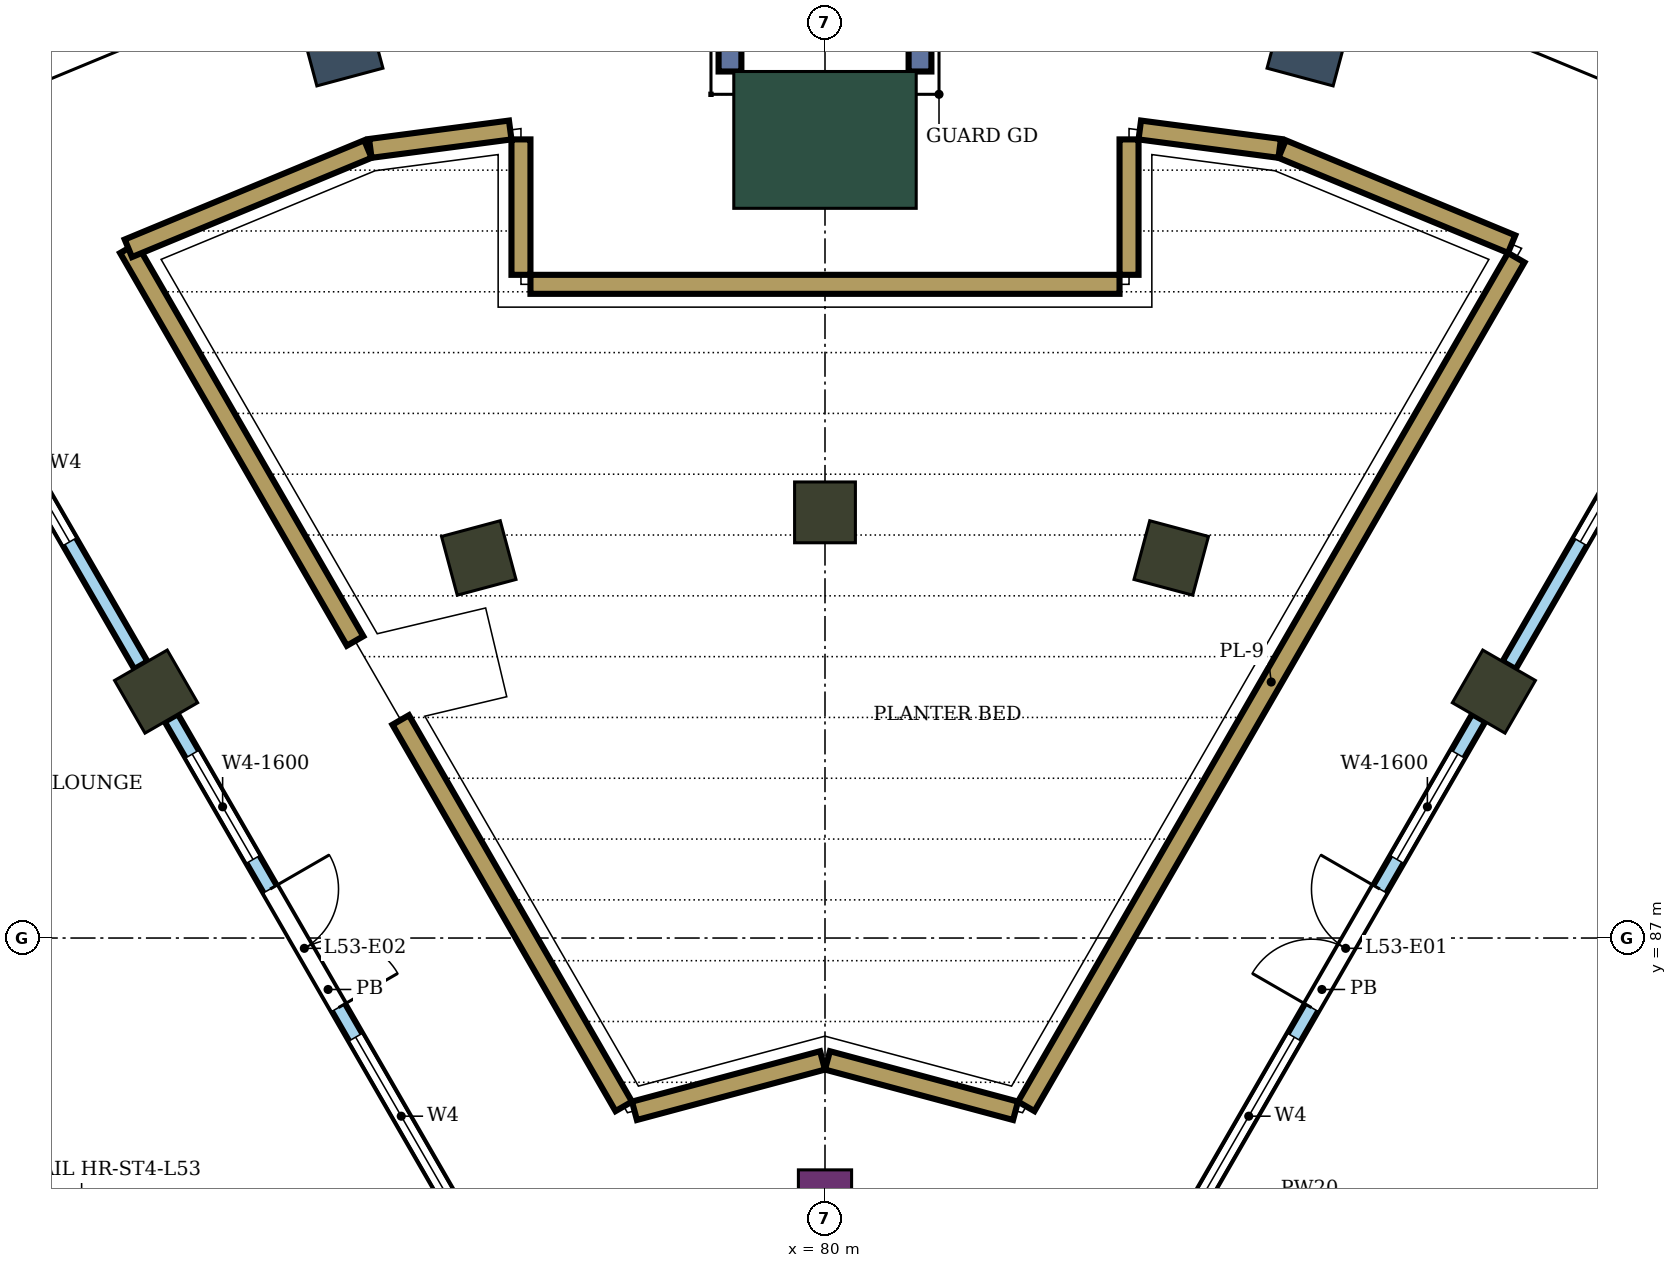
"""IFC4 building model, lengths in metres.
Left out: names, types, materials, properties, quantities, classifications, styles, units other than length and angle.
Written with IfcOpenShell. Run it as: python <this file> out.ifc"""

import sys

from ifc_helpers import new_model, si_unit, direction, frame, frame_2d, origin, origin_2d, place, context, subcontext, project, spatial, rectangle, extrude, element, fill, save


model = new_model("IFC4")
c1 = context("Model", 3, precision=1e-05, world=origin(), true_north=direction((0.0, 1.0)))
c2 = subcontext(c1, "Body", "Model", "MODEL_VIEW")
j1 = project(units=[si_unit("LENGTHUNIT", "METRE"), si_unit("PLANEANGLEUNIT", "RADIAN")], contexts=[c1])
p1 = place(None, origin())
s1 = spatial("IfcSite", under=j1, at=p1, CompositionType="ELEMENT")
p2 = place(p1, origin())
s2 = spatial("IfcBuilding", under=s1, at=p2, CompositionType="ELEMENT")
p3 = place(p2, frame((0.0, 0.0, 229.3)))
s3 = spatial("IfcBuildingStorey", under=s2, at=p3, CompositionType="ELEMENT", Elevation=229.3)
for number, where, z_axis, x_axis in (
    (1, (86.367, 98.762, 0.0), (0.0, 0.0, 1.0), (0.259, 0.966, 0.0)),
    (2, (73.633, 98.762, 0.0), (0.0, 0.0, 1.0), (-0.259, 0.966, 0.0)),
):
    element("IfcColumn", number, at=place(p3, frame(where, z_axis=z_axis, x_axis=x_axis)), inside=s3, PredefinedType="COLUMN", context=c2, shape_type="SweptSolid", body=[
        extrude(rectangle(XDim=0.9, YDim=0.9, at=origin_2d()), origin(), (0.0, 0.0, 1.0), 8.0),
    ])
for number, where, z_axis, x_axis in (
    (3, (88.8, 90.242, 0.0), (0.0, 0.0, 1.0), (0.5, 0.866, 0.0)),
    (4, (84.555, 92.0, 0.0), (0.0, 0.0, 1.0), (0.259, 0.966, 0.0)),
    (5, (80.0, 92.6, 0.0), (0.0, 0.0, 1.0), (0.0, 1.0, 0.0)),
    (6, (75.445, 92.0, 0.0), (0.0, 0.0, 1.0), (-0.259, 0.966, 0.0)),
    (7, (71.2, 90.242, 0.0), (0.0, 0.0, 1.0), (-0.5, 0.866, 0.0)),
):
    element("IfcColumn", number, at=place(p3, frame(where, z_axis=z_axis, x_axis=x_axis)), inside=s3, PredefinedType="COLUMN", context=c2, shape_type="SweptSolid", body=[
        extrude(rectangle(XDim=0.8, YDim=0.8, at=origin_2d()), origin(), (0.0, 0.0, 1.0), 8.0),
    ])
p4 = place(p3, frame((80.0, 83.6, 0.0), z_axis=(0.0, 0.0, 1.0), x_axis=(0.0, 1.0, 0.0)))
e8 = element("IfcColumn", 8, at=p4, inside=s3, PredefinedType="COLUMN", context=c2, shape_type="SweptSolid", body=[
    extrude(rectangle(XDim=0.7, YDim=0.7, at=origin_2d()), origin(), (0.0, 0.0, 1.0), 8.0),
])
p5 = place(p3, frame((80.0, 97.5, 0.0), z_axis=(0.0, 0.0, 1.0), x_axis=(0.0, 1.0, 0.0)))
e9 = element("IfcColumn", 9, at=p5, inside=s3, PredefinedType="COLUMN", context=c2, shape_type="SweptSolid", body=[
    extrude(rectangle(XDim=1.8, YDim=2.4, at=origin_2d()), origin(), (0.0, 0.0, 1.0), 8.0),
])
for number, where, z_axis, x_axis in (
    (10, (81.25, 98.4, 0.0), (0.0, 0.0, 1.0), (0.0, 1.0, 0.0)),
    (11, (78.75, 98.4, 0.0), (0.0, 0.0, 1.0), (0.0, 1.0, 0.0)),
):
    element("IfcWall", number, at=place(p3, frame(where, z_axis=z_axis, x_axis=x_axis)), inside=s3, PredefinedType="NOTDEFINED", context=c2, shape_type="SweptSolid", body=[
        extrude(rectangle(XDim=2.416, YDim=0.3, at=frame_2d((1.208, 0.0))), origin(), (0.0, 0.0, 1.0), 8.0),
    ])
p6 = place(p3, frame((70.835, 96.074, 0.0), z_axis=(0.0, 0.0, 1.0), x_axis=(0.500003486784, -0.866023390679, 0.0)))
e12 = element("IfcWall", 12, at=p6, inside=s3, PredefinedType="USERDEFINED", context=c2, shape_type="SweptSolid", body=[
    extrude(rectangle(XDim=5.966, YDim=0.25, at=frame_2d((2.983, 0.0))), origin(), (0.0, 0.0, 1.0), 0.6),
])
p7 = place(p3, frame((74.418, 89.869, 0.0), z_axis=(0.0, 0.0, 1.0), x_axis=(0.499999689456, -0.866025583077, 0.0)))
e13 = element("IfcWall", 13, at=p7, inside=s3, PredefinedType="USERDEFINED", context=c2, shape_type="SweptSolid", body=[
    extrude(rectangle(XDim=5.87, YDim=0.25, at=frame_2d((2.935, 0.0))), origin(), (0.0, 0.0, 1.0), 0.6),
])
for number, where, z_axis, x_axis in (
    (14, (77.493, 84.727, 0.0), (0.0, 0.0, 1.0), (0.966, 0.259, 0.0)),
    (15, (80.032, 85.39, 0.0), (0.0, 0.0, 1.0), (0.966, -0.259, 0.0)),
):
    element("IfcWall", number, at=place(p3, frame(where, z_axis=z_axis, x_axis=x_axis)), inside=s3, PredefinedType="USERDEFINED", context=c2, shape_type="SweptSolid", body=[
        extrude(rectangle(XDim=2.562, YDim=0.25, at=frame_2d((1.281, 0.0))), origin(), (0.0, 0.0, 1.0), 0.6),
    ])
p8 = place(p3, frame((82.647, 84.785, 0.0), z_axis=(0.0, 0.0, 1.0), x_axis=(0.499992370413, 0.866029808684, 0.0)))
e16 = element("IfcWall", 16, at=p8, inside=s3, PredefinedType="USERDEFINED", context=c2, shape_type="SweptSolid", body=[
    extrude(rectangle(XDim=12.893, YDim=0.25, at=frame_2d((6.446, 0.0))), origin(), (0.0, 0.0, 1.0), 0.6),
])
p9 = place(p3, frame((89.033, 96.129, 0.0), z_axis=(0.0, 0.0, 1.0), x_axis=(-0.923863886655, 0.382721202621, 0.0)))
e17 = element("IfcWall", 17, at=p9, inside=s3, PredefinedType="USERDEFINED", context=c2, shape_type="SweptSolid", body=[
    extrude(rectangle(XDim=3.269, YDim=0.25, at=frame_2d((1.634, 0.0))), origin(), (0.0, 0.0, 1.0), 0.6),
])
p10 = place(p3, frame((85.982, 97.388, 0.0), z_axis=(0.0, 0.0, 1.0), x_axis=(-0.991436829887, 0.130587182926, 0.0)))
e18 = element("IfcWall", 18, at=p10, inside=s3, PredefinedType="USERDEFINED", context=c2, shape_type="SweptSolid", body=[
    extrude(rectangle(XDim=1.856, YDim=0.25, at=frame_2d((0.928, 0.0))), origin(), (0.0, 0.0, 1.0), 0.6),
])
p11 = place(p3, frame((84.0, 97.507, 0.0), z_axis=(0.0, 0.0, 1.0), x_axis=(0.0, -1.0, 0.0)))
e19 = element("IfcWall", 19, at=p11, inside=s3, PredefinedType="USERDEFINED", context=c2, shape_type="SweptSolid", body=[
    extrude(rectangle(XDim=1.781, YDim=0.25, at=frame_2d((0.891, 0.0))), origin(), (0.0, 0.0, 1.0), 0.6),
])
p12 = place(p3, frame((83.875, 95.6, 0.0), z_axis=(0.0, 0.0, 1.0), x_axis=(-1.0, 0.0, 0.0)))
e20 = element("IfcWall", 20, at=p12, inside=s3, PredefinedType="USERDEFINED", context=c2, shape_type="SweptSolid", body=[
    extrude(rectangle(XDim=7.75, YDim=0.25, at=frame_2d((3.875, 0.0))), origin(), (0.0, 0.0, 1.0), 0.6),
])
p13 = place(p3, frame((76.0, 95.725, 0.0), z_axis=(0.0, 0.0, 1.0), x_axis=(0.0, 1.0, 0.0)))
e21 = element("IfcWall", 21, at=p13, inside=s3, PredefinedType="USERDEFINED", context=c2, shape_type="SweptSolid", body=[
    extrude(rectangle(XDim=1.781, YDim=0.25, at=frame_2d((0.891, 0.0))), origin(), (0.0, 0.0, 1.0), 0.6),
])
p14 = place(p3, frame((75.859, 97.631, 0.0), z_axis=(0.0, 0.0, 1.0), x_axis=(-0.991436829887, -0.130587182926, 0.0)))
e22 = element("IfcWall", 22, at=p14, inside=s3, PredefinedType="USERDEFINED", context=c2, shape_type="SweptSolid", body=[
    extrude(rectangle(XDim=1.856, YDim=0.25, at=frame_2d((0.928, 0.0))), origin(), (0.0, 0.0, 1.0), 0.6),
])
p15 = place(p3, frame((73.986, 97.38, 0.0), z_axis=(0.0, 0.0, 1.0), x_axis=(-0.923871147788, -0.38270367425, 0.0)))
e23 = element("IfcWall", 23, at=p15, inside=s3, PredefinedType="USERDEFINED", context=c2, shape_type="SweptSolid", body=[
    extrude(rectangle(XDim=3.411, YDim=0.25, at=frame_2d((1.706, 0.0))), origin(), (0.0, 0.0, 1.0), 0.6),
])
p16 = place(p3, frame((84.475, 82.751, 0.0), z_axis=(0.0, 0.0, 1.0), x_axis=(0.499996545922, 0.866027397988, 0.0)))
e24 = element("IfcWall", 24, at=p16, inside=s3, PredefinedType="NOTDEFINED", context=c2, shape_type="SweptSolid", body=[
    extrude(rectangle(XDim=8.25, YDim=0.2, at=frame_2d((4.125, 0.0))), origin(), (0.0, 0.0, 1.0), 8.0),
])
p17 = place(p16, frame((1.0, 0.0, 0.3)))
e25 = element("IfcOpeningElement", 25, at=p17, cuts=e24, PredefinedType="OPENING", context=c2, shape_type="SweptSolid", body=[
    extrude(rectangle(XDim=2.4, YDim=3.6, at=frame_2d((1.2, 1.8))), frame((0.0, 0.11, 0.0), z_axis=(0.0, -1.0, 0.0), x_axis=(1.0, 0.0, 0.0)), (0.0, 0.0, 1.0), 0.22),
])
p18 = place(p16, frame((3.85, 0.0, 0.0)))
e26 = element("IfcOpeningElement", 26, at=p18, cuts=e24, PredefinedType="OPENING", context=c2, shape_type="SweptSolid", body=[
    extrude(rectangle(XDim=1.8, YDim=2.4, at=frame_2d((0.9, 1.2))), frame((0.0, 0.11, 0.0), z_axis=(0.0, -1.0, 0.0), x_axis=(1.0, 0.0, 0.0)), (0.0, 0.0, 1.0), 0.22),
])
p19 = place(p16, frame((6.1, 0.0, 0.3)))
e27 = element("IfcOpeningElement", 27, at=p19, cuts=e24, PredefinedType="OPENING", context=c2, shape_type="SweptSolid", body=[
    extrude(rectangle(XDim=1.6, YDim=3.6, at=frame_2d((0.8, 1.8))), frame((0.0, 0.11, 0.0), z_axis=(0.0, -1.0, 0.0), x_axis=(1.0, 0.0, 0.0)), (0.0, 0.0, 1.0), 0.22),
])
p20 = place(p3, frame((89.0, 90.588, 0.0), z_axis=(0.0, 0.0, 1.0), x_axis=(0.499985903289, 0.866033542371, 0.0)))
e28 = element("IfcWall", 28, at=p20, inside=s3, PredefinedType="NOTDEFINED", context=c2, shape_type="SweptSolid", body=[
    extrude(rectangle(XDim=6.15, YDim=0.2, at=frame_2d((3.075, 0.0))), origin(), (0.0, 0.0, 1.0), 8.0),
])
p21 = place(p20, frame((1.875, 0.0, 0.3)))
e29 = element("IfcOpeningElement", 29, at=p21, cuts=e28, PredefinedType="OPENING", context=c2, shape_type="SweptSolid", body=[
    extrude(rectangle(XDim=2.4, YDim=3.6, at=frame_2d((1.2, 1.8))), frame((0.0, 0.11, 0.0), z_axis=(0.0, -1.0, 0.0), x_axis=(1.0, 0.0, 0.0)), (0.0, 0.0, 1.0), 0.22),
])
p22 = place(p3, frame((75.525, 82.751, 0.0), z_axis=(0.0, 0.0, 1.0), x_axis=(-0.499996545922, 0.866027397988, 0.0)))
e30 = element("IfcWall", 30, at=p22, inside=s3, PredefinedType="NOTDEFINED", context=c2, shape_type="SweptSolid", body=[
    extrude(rectangle(XDim=8.25, YDim=0.2, at=frame_2d((4.125, 0.0))), origin(), (0.0, 0.0, 1.0), 8.0),
])
p23 = place(p22, frame((1.0, 0.0, 0.3)))
e31 = element("IfcOpeningElement", 31, at=p23, cuts=e30, PredefinedType="OPENING", context=c2, shape_type="SweptSolid", body=[
    extrude(rectangle(XDim=2.4, YDim=3.6, at=frame_2d((1.2, 1.8))), frame((0.0, 0.11, 0.0), z_axis=(0.0, -1.0, 0.0), x_axis=(1.0, 0.0, 0.0)), (0.0, 0.0, 1.0), 0.22),
])
p24 = place(p22, frame((3.85, 0.0, 0.0)))
e32 = element("IfcOpeningElement", 32, at=p24, cuts=e30, PredefinedType="OPENING", context=c2, shape_type="SweptSolid", body=[
    extrude(rectangle(XDim=1.8, YDim=2.4, at=frame_2d((0.9, 1.2))), frame((0.0, 0.11, 0.0), z_axis=(0.0, -1.0, 0.0), x_axis=(1.0, 0.0, 0.0)), (0.0, 0.0, 1.0), 0.22),
])
p25 = place(p22, frame((6.1, 0.0, 0.3)))
e33 = element("IfcOpeningElement", 33, at=p25, cuts=e30, PredefinedType="OPENING", context=c2, shape_type="SweptSolid", body=[
    extrude(rectangle(XDim=1.6, YDim=3.6, at=frame_2d((0.8, 1.8))), frame((0.0, 0.11, 0.0), z_axis=(0.0, -1.0, 0.0), x_axis=(1.0, 0.0, 0.0)), (0.0, 0.0, 1.0), 0.22),
])
p26 = place(p3, frame((71.0, 90.588, 0.0), z_axis=(0.0, 0.0, 1.0), x_axis=(-0.499985903289, 0.866033542371, 0.0)))
e34 = element("IfcWall", 34, at=p26, inside=s3, PredefinedType="NOTDEFINED", context=c2, shape_type="SweptSolid", body=[
    extrude(rectangle(XDim=6.15, YDim=0.2, at=frame_2d((3.075, 0.0))), origin(), (0.0, 0.0, 1.0), 8.0),
])
p27 = place(p26, frame((1.875, 0.0, 0.3)))
e35 = element("IfcOpeningElement", 35, at=p27, cuts=e34, PredefinedType="OPENING", context=c2, shape_type="SweptSolid", body=[
    extrude(rectangle(XDim=2.4, YDim=3.6, at=frame_2d((1.2, 1.8))), frame((0.0, 0.11, 0.0), z_axis=(0.0, -1.0, 0.0), x_axis=(1.0, 0.0, 0.0)), (0.0, 0.0, 1.0), 0.22),
])
p28 = place(p17, origin())
e36 = element("IfcWindow", 36, at=p28, inside=s3, PartitioningType="SINGLE_PANEL", PredefinedType="WINDOW", context=c2, shape_type="SweptSolid", body=[
    extrude(rectangle(XDim=2.4, YDim=3.6, at=frame_2d((1.2, 1.8))), frame((0.0, 0.03, 0.0), z_axis=(0.0, -1.0, 0.0), x_axis=(1.0, 0.0, 0.0)), (0.0, 0.0, 1.0), 0.06),
])
fill(e25, e36)
p29 = place(p18, origin())
e37 = element("IfcDoor", 37, at=p29, inside=s3, OperationType="DOUBLE_DOOR_SINGLE_SWING", PredefinedType="DOOR", context=c2, shape_type="SweptSolid", body=[
    extrude(rectangle(XDim=1.8, YDim=2.4, at=frame_2d((0.9, 1.2))), frame((0.0, 0.025, 0.0), z_axis=(0.0, -1.0, 0.0), x_axis=(1.0, 0.0, 0.0)), (0.0, 0.0, 1.0), 0.05),
])
fill(e26, e37)
p30 = place(p19, origin())
e38 = element("IfcWindow", 38, at=p30, inside=s3, PartitioningType="SINGLE_PANEL", PredefinedType="WINDOW", context=c2, shape_type="SweptSolid", body=[
    extrude(rectangle(XDim=1.6, YDim=3.6, at=frame_2d((0.8, 1.8))), frame((0.0, 0.03, 0.0), z_axis=(0.0, -1.0, 0.0), x_axis=(1.0, 0.0, 0.0)), (0.0, 0.0, 1.0), 0.06),
])
fill(e27, e38)
p31 = place(p21, origin())
e39 = element("IfcWindow", 39, at=p31, inside=s3, PartitioningType="SINGLE_PANEL", PredefinedType="WINDOW", context=c2, shape_type="SweptSolid", body=[
    extrude(rectangle(XDim=2.4, YDim=3.6, at=frame_2d((1.2, 1.8))), frame((0.0, 0.03, 0.0), z_axis=(0.0, -1.0, 0.0), x_axis=(1.0, 0.0, 0.0)), (0.0, 0.0, 1.0), 0.06),
])
fill(e29, e39)
p32 = place(p23, origin())
e40 = element("IfcWindow", 40, at=p32, inside=s3, PartitioningType="SINGLE_PANEL", PredefinedType="WINDOW", context=c2, shape_type="SweptSolid", body=[
    extrude(rectangle(XDim=2.4, YDim=3.6, at=frame_2d((1.2, 1.8))), frame((0.0, 0.03, 0.0), z_axis=(0.0, -1.0, 0.0), x_axis=(1.0, 0.0, 0.0)), (0.0, 0.0, 1.0), 0.06),
])
fill(e31, e40)
p33 = place(p24, frame((1.8, 0.0, 0.0), z_axis=(0.0, 0.0, 1.0), x_axis=(-1.0, 0.0, 0.0)))
e41 = element("IfcDoor", 41, at=p33, inside=s3, OperationType="DOUBLE_DOOR_SINGLE_SWING", PredefinedType="DOOR", context=c2, shape_type="SweptSolid", body=[
    extrude(rectangle(XDim=1.8, YDim=2.4, at=frame_2d((0.9, 1.2))), frame((0.0, 0.025, 0.0), z_axis=(0.0, -1.0, 0.0), x_axis=(1.0, 0.0, 0.0)), (0.0, 0.0, 1.0), 0.05),
])
fill(e32, e41)
p34 = place(p25, origin())
e42 = element("IfcWindow", 42, at=p34, inside=s3, PartitioningType="SINGLE_PANEL", PredefinedType="WINDOW", context=c2, shape_type="SweptSolid", body=[
    extrude(rectangle(XDim=1.6, YDim=3.6, at=frame_2d((0.8, 1.8))), frame((0.0, 0.03, 0.0), z_axis=(0.0, -1.0, 0.0), x_axis=(1.0, 0.0, 0.0)), (0.0, 0.0, 1.0), 0.06),
])
fill(e33, e42)
p35 = place(p27, origin())
e43 = element("IfcWindow", 43, at=p35, inside=s3, PartitioningType="SINGLE_PANEL", PredefinedType="WINDOW", context=c2, shape_type="SweptSolid", body=[
    extrude(rectangle(XDim=2.4, YDim=3.6, at=frame_2d((1.2, 1.8))), frame((0.0, 0.03, 0.0), z_axis=(0.0, -1.0, 0.0), x_axis=(1.0, 0.0, 0.0)), (0.0, 0.0, 1.0), 0.06),
])
fill(e35, e43)
save(model, sys.argv[1])
